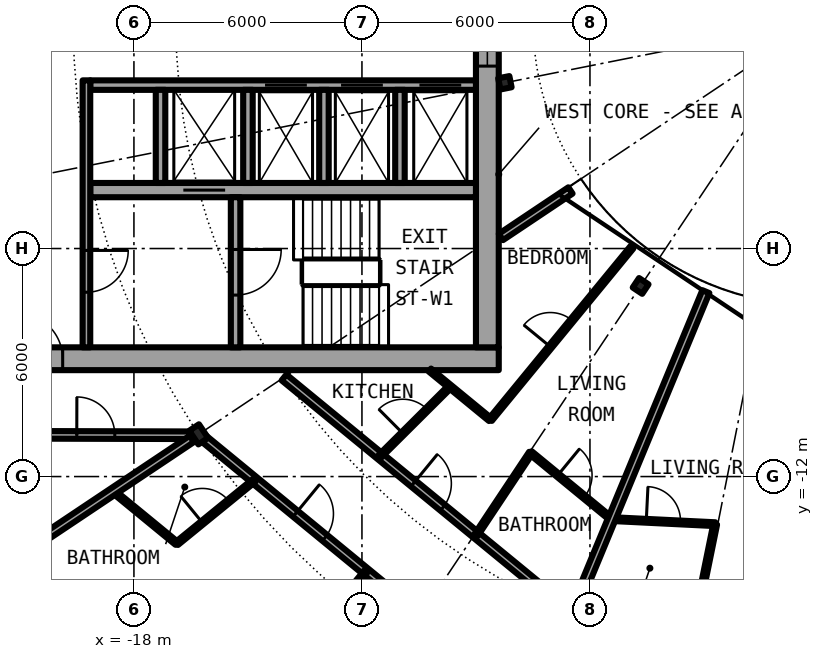
"""IFC4 building model, lengths in metres.
Left out: names, types, materials, properties, quantities, classifications, styles, units other than length and angle.
Written with IfcOpenShell. Run it as: python <this file> out.ifc"""

import sys

from ifc_helpers import new_model, si_unit, direction, frame, frame_2d, origin, origin_2d, place, context, subcontext, project, spatial, rectangle, i_section, extrude, element, fill, save


model = new_model("IFC4")
c1 = context("Model", 3, precision=1e-05, world=origin(), true_north=direction((0.0, 1.0)))
c2 = subcontext(c1, "Body", "Model", "MODEL_VIEW")
j1 = project(units=[si_unit("LENGTHUNIT", "METRE"), si_unit("PLANEANGLEUNIT", "RADIAN")], contexts=[c1])
p1 = place(None, origin())
s1 = spatial("IfcSite", under=j1, at=p1, CompositionType="ELEMENT")
p2 = place(p1, origin())
s2 = spatial("IfcBuilding", under=s1, at=p2, CompositionType="ELEMENT")
p3 = place(p2, frame((0.0, 0.0, 111.65)))
s3 = spatial("IfcBuildingStorey", under=s2, at=p3, CompositionType="ELEMENT", Elevation=111.65)
p4 = place(p3, frame((-16.297, -10.889, 0.0), z_axis=(0.0, 0.0, 1.0), x_axis=(-0.831469612303, -0.55557023302, 0.0)))
e1 = element("IfcColumn", 1, at=p4, inside=s3, PredefinedType="COLUMN", context=c2, shape_type="SweptSolid", body=[
    extrude(i_section(OverallWidth=0.307, OverallDepth=0.432, WebThickness=0.021, FlangeThickness=0.04, FilletRadius=0.027, at=origin_2d()), origin(), (0.0, 0.0, 1.0), 3.05),
])
for number, where, z_axis, x_axis in (
    (2, (-8.239, -1.639, 0.0), (0.0, 0.0, 1.0), (-0.981, -0.195, 0.0)),
    (3, (-4.667, -6.984, 0.0), (0.0, 0.0, 1.0), (-0.556, -0.831, 0.0)),
):
    element("IfcColumn", number, at=place(p3, frame(where, z_axis=z_axis, x_axis=x_axis)), inside=s3, PredefinedType="COLUMN", context=c2, shape_type="SweptSolid", body=[
        extrude(i_section(OverallWidth=0.3, OverallDepth=0.3, WebThickness=0.011, FlangeThickness=0.019, FilletRadius=0.027, at=origin_2d()), origin(), (0.0, 0.0, 1.0), 3.05),
    ])
p5 = place(p3, frame((-22.2, -8.9, 0.0), z_axis=(0.0, 0.0, 1.0), x_axis=(1.0, 0.0, 0.0)))
e4 = element("IfcWall", 4, at=p5, inside=s3, PredefinedType="SHEAR", context=c2, shape_type="SweptSolid", body=[
    extrude(rectangle(XDim=13.8, YDim=0.6, at=frame_2d((6.9, 0.0))), origin(), (0.0, 0.0, 1.0), 3.05),
])
p6 = place(p5, frame((1.125, 0.0, 0.0)))
e5 = element("IfcOpeningElement", 5, at=p6, cuts=e4, PredefinedType="OPENING", context=c2, shape_type="SweptSolid", body=[
    extrude(rectangle(XDim=1.2, YDim=2.3, at=frame_2d((0.6, 1.15))), frame((0.0, 0.31, 0.0), z_axis=(0.0, -1.0, 0.0), x_axis=(1.0, 0.0, 0.0)), (0.0, 0.0, 1.0), 0.62),
])
p7 = place(p3, frame((-8.7, 8.6, 0.0), z_axis=(0.0, 0.0, 1.0), x_axis=(0.0, -1.0, 0.0)))
e6 = element("IfcWall", 6, at=p7, inside=s3, PredefinedType="SHEAR", context=c2, shape_type="SweptSolid", body=[
    extrude(rectangle(XDim=17.2, YDim=0.6, at=frame_2d((8.6, 0.0))), origin(), (0.0, 0.0, 1.0), 3.05),
])
p8 = place(p7, frame((7.4, 0.0, 0.1)))
e7 = element("IfcOpeningElement", 7, at=p8, cuts=e6, PredefinedType="OPENING", context=c2, shape_type="SweptSolid", body=[
    extrude(rectangle(XDim=2.4, YDim=2.2, at=frame_2d((1.2, 1.1))), frame((0.0, 0.31, 0.0), z_axis=(0.0, -1.0, 0.0), x_axis=(1.0, 0.0, 0.0)), (0.0, 0.0, 1.0), 0.62),
])
p9 = place(p3, frame((-9.0, -1.7, 0.0), z_axis=(0.0, 0.0, 1.0), x_axis=(-1.0, 0.0, 0.0)))
e8 = element("IfcWall", 8, at=p9, inside=s3, PredefinedType="SHEAR", context=c2, shape_type="SweptSolid", body=[
    extrude(rectangle(XDim=10.15, YDim=0.25, at=frame_2d((5.075, 0.0))), origin(), (0.0, 0.0, 1.0), 3.05),
])
p10 = place(p9, frame((0.387, 0.0, 0.0)))
e9 = element("IfcOpeningElement", 9, at=p10, cuts=e8, PredefinedType="OPENING", context=c2, shape_type="SweptSolid", body=[
    extrude(rectangle(XDim=1.1, YDim=2.3, at=frame_2d((0.55, 1.15))), frame((0.0, 0.135, 0.0), z_axis=(0.0, -1.0, 0.0), x_axis=(1.0, 0.0, 0.0)), (0.0, 0.0, 1.0), 0.27),
])
p11 = place(p9, frame((2.45, 0.0, 0.0)))
e10 = element("IfcOpeningElement", 10, at=p11, cuts=e8, PredefinedType="OPENING", context=c2, shape_type="SweptSolid", body=[
    extrude(rectangle(XDim=1.1, YDim=2.3, at=frame_2d((0.55, 1.15))), frame((0.0, 0.135, 0.0), z_axis=(0.0, -1.0, 0.0), x_axis=(1.0, 0.0, 0.0)), (0.0, 0.0, 1.0), 0.27),
])
p12 = place(p9, frame((4.45, 0.0, 0.0)))
e11 = element("IfcOpeningElement", 11, at=p12, cuts=e8, PredefinedType="OPENING", context=c2, shape_type="SweptSolid", body=[
    extrude(rectangle(XDim=1.1, YDim=2.3, at=frame_2d((0.55, 1.15))), frame((0.0, 0.135, 0.0), z_axis=(0.0, -1.0, 0.0), x_axis=(1.0, 0.0, 0.0)), (0.0, 0.0, 1.0), 0.27),
])
p13 = place(p3, frame((-9.0, -4.462, 0.0), z_axis=(0.0, 0.0, 1.0), x_axis=(-1.0, 0.0, 0.0)))
e12 = element("IfcWall", 12, at=p13, inside=s3, PredefinedType="SHEAR", context=c2, shape_type="SweptSolid", body=[
    extrude(rectangle(XDim=10.15, YDim=0.375, at=frame_2d((5.075, 0.0))), origin(), (0.0, 0.0, 1.0), 3.05),
])
p14 = place(p13, frame((6.6, 0.0, 0.0)))
e13 = element("IfcOpeningElement", 13, at=p14, cuts=e12, PredefinedType="OPENING", context=c2, shape_type="SweptSolid", body=[
    extrude(rectangle(XDim=1.1, YDim=2.3, at=frame_2d((0.55, 1.15))), frame((0.0, 0.198, 0.0), z_axis=(0.0, -1.0, 0.0), x_axis=(1.0, 0.0, 0.0)), (0.0, 0.0, 1.0), 0.395),
])
p15 = place(p3, frame((-15.325, -4.65, 0.0), z_axis=(0.0, 0.0, 1.0), x_axis=(0.0, -1.0, 0.0)))
e14 = element("IfcWall", 14, at=p15, inside=s3, PredefinedType="SHEAR", context=c2, shape_type="SweptSolid", body=[
    extrude(rectangle(XDim=3.95, YDim=0.25, at=frame_2d((1.975, 0.0))), origin(), (0.0, 0.0, 1.0), 3.05),
])
p16 = place(p15, frame((1.375, 0.0, 0.0)))
e15 = element("IfcOpeningElement", 15, at=p16, cuts=e14, PredefinedType="OPENING", context=c2, shape_type="SweptSolid", body=[
    extrude(rectangle(XDim=1.2, YDim=2.3, at=frame_2d((0.6, 1.15))), frame((0.0, 0.135, 0.0), z_axis=(0.0, -1.0, 0.0), x_axis=(1.0, 0.0, 0.0)), (0.0, 0.0, 1.0), 0.27),
])
for number, where, z_axis, x_axis in (
    (16, (-15.0, -1.825, 0.0), (0.0, 0.0, 1.0), (0.0, -1.0, 0.0)),
    (17, (-17.3, -1.825, 0.0), (0.0, 0.0, 1.0), (0.0, -1.0, 0.0)),
):
    element("IfcWall", number, at=place(p3, frame(where, z_axis=z_axis, x_axis=x_axis)), inside=s3, PredefinedType="SOLIDWALL", context=c2, shape_type="SweptSolid", body=[
        extrude(rectangle(XDim=2.45, YDim=0.25, at=frame_2d((1.225, 0.0))), origin(), (0.0, 0.0, 1.0), 2.7),
    ])
p17 = place(p3, frame((-19.25, -1.575, 0.0), z_axis=(0.0, 0.0, 1.0), x_axis=(0.0, -1.0, 0.0)))
e18 = element("IfcWall", 18, at=p17, inside=s3, PredefinedType="SOLIDWALL", context=c2, shape_type="SweptSolid", body=[
    extrude(rectangle(XDim=7.025, YDim=0.2, at=frame_2d((3.513, 0.0))), origin(), (0.0, 0.0, 1.0), 2.7),
])
p18 = place(p17, frame((4.475, 0.0, 0.0)))
e19 = element("IfcOpeningElement", 19, at=p18, cuts=e18, PredefinedType="OPENING", context=c2, shape_type="SweptSolid", body=[
    extrude(rectangle(XDim=1.1, YDim=2.3, at=frame_2d((0.55, 1.15))), frame((0.0, 0.11, 0.0), z_axis=(0.0, -1.0, 0.0), x_axis=(1.0, 0.0, 0.0)), (0.0, 0.0, 1.0), 0.22),
])
for number, where, z_axis, x_axis in (
    (20, (-11.0, -1.825, 0.0), (0.0, 0.0, 1.0), (0.0, -1.0, 0.0)),
    (21, (-13.0, -1.825, 0.0), (0.0, 0.0, 1.0), (0.0, -1.0, 0.0)),
):
    element("IfcWall", number, at=place(p3, frame(where, z_axis=z_axis, x_axis=x_axis)), inside=s3, PredefinedType="SOLIDWALL", context=c2, shape_type="SweptSolid", body=[
        extrude(rectangle(XDim=2.45, YDim=0.25, at=frame_2d((1.225, 0.0))), origin(), (0.0, 0.0, 1.0), 2.7),
    ])
p19 = place(p3, frame((-18.542, -12.389, 0.0), z_axis=(0.0, 0.0, 1.0), x_axis=(0.772948171844, -0.634469166818, 0.0)))
e22 = element("IfcWall", 22, at=p19, inside=s3, PredefinedType="PARTITIONING", context=c2, shape_type="SweptSolid", body=[
    extrude(rectangle(XDim=2.158, YDim=0.1, at=frame_2d((1.079, 0.0))), origin(), (0.0, 0.0, 1.0), 2.7),
])
p20 = place(p3, frame((-16.173, -10.991, 0.0), z_axis=(0.0, 0.0, 1.0), x_axis=(0.773013989296, -0.634388975591, 0.0)))
e23 = element("IfcWall", 23, at=p20, inside=s3, PredefinedType="PARTITIONING", context=c2, shape_type="SweptSolid", body=[
    extrude(rectangle(XDim=11.219, YDim=0.2, at=frame_2d((5.609, 0.0))), origin(), (0.0, 0.0, 1.0), 2.39),
])
p21 = place(p20, frame((3.135, 0.0, 0.0)))
e24 = element("IfcOpeningElement", 24, at=p21, cuts=e23, PredefinedType="OPENING", context=c2, shape_type="SweptSolid", body=[
    extrude(rectangle(XDim=1.0, YDim=2.3, at=frame_2d((0.5, 1.15))), frame((0.0, 0.11, 0.0), z_axis=(0.0, -1.0, 0.0), x_axis=(1.0, 0.0, 0.0)), (0.0, 0.0, 1.0), 0.22),
])
p22 = place(p3, frame((-14.05, -9.392, 0.0), z_axis=(0.0, 0.0, 1.0), x_axis=(0.773074935257, -0.634314704605, 0.0)))
e25 = element("IfcWall", 25, at=p22, inside=s3, PredefinedType="PARTITIONING", context=c2, shape_type="SweptSolid", body=[
    extrude(rectangle(XDim=9.809, YDim=0.2, at=frame_2d((4.904, 0.0))), origin(), (0.0, 0.0, 1.0), 2.7),
])
p23 = place(p22, frame((4.402, 0.0, 0.0)))
e26 = element("IfcOpeningElement", 26, at=p23, cuts=e25, PredefinedType="OPENING", context=c2, shape_type="SweptSolid", body=[
    extrude(rectangle(XDim=1.0, YDim=2.3, at=frame_2d((0.5, 1.15))), frame((0.0, 0.11, 0.0), z_axis=(0.0, -1.0, 0.0), x_axis=(1.0, 0.0, 0.0)), (0.0, 0.0, 1.0), 0.22),
])
p24 = place(p3, frame((-10.213, -9.197, 0.0), z_axis=(0.0, 0.0, 1.0), x_axis=(0.772817828959, -0.634627925042, 0.0)))
e27 = element("IfcWall", 27, at=p24, inside=s3, PredefinedType="PARTITIONING", context=c2, shape_type="SweptSolid", body=[
    extrude(rectangle(XDim=2.055, YDim=0.1, at=frame_2d((1.027, 0.0))), origin(), (0.0, 0.0, 1.0), 2.7),
])
p25 = place(p3, frame((-7.563, -11.373, 0.0), z_axis=(0.0, 0.0, 1.0), x_axis=(0.772732480827, -0.634731843439, 0.0)))
e28 = element("IfcWall", 28, at=p25, inside=s3, PredefinedType="PARTITIONING", context=c2, shape_type="SweptSolid", body=[
    extrude(rectangle(XDim=2.748, YDim=0.1, at=frame_2d((1.374, 0.0))), origin(), (0.0, 0.0, 1.0), 2.7),
])
p26 = place(p25, frame((0.93, 0.0, 0.0)))
e29 = element("IfcOpeningElement", 29, at=p26, cuts=e28, PredefinedType="OPENING", context=c2, shape_type="SweptSolid", body=[
    extrude(rectangle(XDim=0.9, YDim=2.3, at=frame_2d((0.45, 1.15))), frame((0.0, 0.06, 0.0), z_axis=(0.0, -1.0, 0.0), x_axis=(1.0, 0.0, 0.0)), (0.0, 0.0, 1.0), 0.12),
])
p27 = place(p3, frame((-5.434, -13.119, 0.0), z_axis=(0.0, 0.0, 1.0), x_axis=(0.998796928508, -0.049037695739, 0.0)))
e30 = element("IfcWall", 30, at=p27, inside=s3, PredefinedType="PARTITIONING", context=c2, shape_type="SweptSolid", body=[
    extrude(rectangle(XDim=2.733, YDim=0.1, at=frame_2d((1.367, 0.0))), origin(), (0.0, 0.0, 1.0), 2.7),
])
p28 = place(p27, frame((0.917, 0.0, 0.0)))
e31 = element("IfcOpeningElement", 31, at=p28, cuts=e30, PredefinedType="OPENING", context=c2, shape_type="SweptSolid", body=[
    extrude(rectangle(XDim=0.9, YDim=2.3, at=frame_2d((0.45, 1.15))), frame((0.0, 0.06, 0.0), z_axis=(0.0, -1.0, 0.0), x_axis=(1.0, 0.0, 0.0)), (0.0, 0.0, 1.0), 0.12),
])
p29 = place(p3, frame((-21.675, -10.9, 0.0), z_axis=(0.0, 0.0, 1.0), x_axis=(0.99999670426, -0.002567385634, 0.0)))
e32 = element("IfcWall", 32, at=p29, inside=s3, PredefinedType="PARTITIONING", context=c2, shape_type="SweptSolid", body=[
    extrude(rectangle(XDim=5.135, YDim=0.2, at=frame_2d((2.567, 0.0))), origin(), (0.0, 0.0, 1.0), 2.7),
])
p30 = place(p29, frame((2.171, 0.0, 0.0)))
e33 = element("IfcOpeningElement", 33, at=p30, cuts=e32, PredefinedType="OPENING", context=c2, shape_type="SweptSolid", body=[
    extrude(rectangle(XDim=1.0, YDim=2.3, at=frame_2d((0.5, 1.15))), frame((0.0, 0.11, 0.0), z_axis=(0.0, -1.0, 0.0), x_axis=(1.0, 0.0, 0.0)), (0.0, 0.0, 1.0), 0.22),
])
p31 = place(p3, frame((-6.513, -4.472, 0.0), z_axis=(0.0, 0.0, 1.0), x_axis=(-0.831333375071, -0.555774072347, 0.0)))
e34 = element("IfcWall", 34, at=p31, inside=s3, PredefinedType="PARTITIONING", context=c2, shape_type="SweptSolid", body=[
    extrude(rectangle(XDim=2.203, YDim=0.2, at=frame_2d((1.101, 0.0))), origin(), (0.0, 0.0, 1.0), 2.7),
])
p32 = place(p3, frame((-22.595, -15.097, 0.0), z_axis=(0.0, 0.0, 1.0), x_axis=(0.831467903109, 0.555572791, 0.0)))
e35 = element("IfcWall", 35, at=p32, inside=s3, PredefinedType="PARTITIONING", context=c2, shape_type="SweptSolid", body=[
    extrude(rectangle(XDim=7.358, YDim=0.2, at=frame_2d((3.679, 0.0))), origin(), (0.0, 0.0, 1.0), 2.7),
])
p33 = place(p3, frame((-17.24, -21.007, 0.0), z_axis=(0.0, 0.0, 1.0), x_axis=(0.634396151441, 0.77300810024, 0.0)))
e36 = element("IfcWall", 36, at=p33, inside=s3, PredefinedType="PARTITIONING", context=c2, shape_type="SweptSolid", body=[
    extrude(rectangle(XDim=8.419, YDim=0.1, at=frame_2d((4.209, 0.0))), origin(), (0.0, 0.0, 1.0), 2.7),
])
p34 = place(p33, frame((6.679, 0.0, 0.0)))
e37 = element("IfcOpeningElement", 37, at=p34, cuts=e36, PredefinedType="OPENING", context=c2, shape_type="SweptSolid", body=[
    extrude(rectangle(XDim=0.9, YDim=2.3, at=frame_2d((0.45, 1.15))), frame((0.0, 0.06, 0.0), z_axis=(0.0, -1.0, 0.0), x_axis=(1.0, 0.0, 0.0)), (0.0, 0.0, 1.0), 0.12),
])
p35 = place(p33, frame((2.468, 0.0, 0.0)))
e38 = element("IfcOpeningElement", 38, at=p35, cuts=e36, PredefinedType="OPENING", context=c2, shape_type="SweptSolid", body=[
    extrude(rectangle(XDim=0.9, YDim=2.3, at=frame_2d((0.45, 1.15))), frame((0.0, 0.06, 0.0), z_axis=(0.0, -1.0, 0.0), x_axis=(1.0, 0.0, 0.0)), (0.0, 0.0, 1.0), 0.12),
])
p36 = place(p3, frame((-16.872, -13.761, 0.0), z_axis=(0.0, 0.0, 1.0), x_axis=(0.774979608522, 0.631986239072, 0.0)))
e39 = element("IfcWall", 39, at=p36, inside=s3, PredefinedType="PARTITIONING", context=c2, shape_type="SweptSolid", body=[
    extrude(rectangle(XDim=2.636, YDim=0.1, at=frame_2d((1.318, 0.0))), origin(), (0.0, 0.0, 1.0), 2.7),
])
p37 = place(p36, frame((0.868, 0.0, 0.0)))
e40 = element("IfcOpeningElement", 40, at=p37, cuts=e39, PredefinedType="OPENING", context=c2, shape_type="SweptSolid", body=[
    extrude(rectangle(XDim=0.9, YDim=2.3, at=frame_2d((0.45, 1.15))), frame((0.0, 0.06, 0.0), z_axis=(0.0, -1.0, 0.0), x_axis=(1.0, 0.0, 0.0)), (0.0, 0.0, 1.0), 0.12),
])
p38 = place(p3, frame((-11.524, -11.464, 0.0), z_axis=(0.0, 0.0, 1.0), x_axis=(0.708796844581, 0.705412668665, 0.0)))
e41 = element("IfcWall", 41, at=p38, inside=s3, PredefinedType="PARTITIONING", context=c2, shape_type="SweptSolid", body=[
    extrude(rectangle(XDim=2.597, YDim=0.1, at=frame_2d((1.299, 0.0))), origin(), (0.0, 0.0, 1.0), 2.7),
])
p39 = place(p38, frame((0.849, 0.0, 0.0)))
e42 = element("IfcOpeningElement", 42, at=p39, cuts=e41, PredefinedType="OPENING", context=c2, shape_type="SweptSolid", body=[
    extrude(rectangle(XDim=0.9, YDim=2.3, at=frame_2d((0.45, 1.15))), frame((0.0, 0.06, 0.0), z_axis=(0.0, -1.0, 0.0), x_axis=(1.0, 0.0, 0.0)), (0.0, 0.0, 1.0), 0.12),
])
p40 = place(p3, frame((-8.996, -13.539, 0.0), z_axis=(0.0, 0.0, 1.0), x_axis=(0.553615197403, 0.83277260594, 0.0)))
e43 = element("IfcWall", 43, at=p40, inside=s3, PredefinedType="PARTITIONING", context=c2, shape_type="SweptSolid", body=[
    extrude(rectangle(XDim=2.597, YDim=0.1, at=frame_2d((1.299, 0.0))), origin(), (0.0, 0.0, 1.0), 2.7),
])
p41 = place(p3, frame((-8.62, -10.504, 0.0), z_axis=(0.0, 0.0, 1.0), x_axis=(0.634539754242, 0.772890225249, 0.0)))
e44 = element("IfcWall", 44, at=p41, inside=s3, PredefinedType="PARTITIONING", context=c2, shape_type="SweptSolid", body=[
    extrude(rectangle(XDim=5.867, YDim=0.1, at=frame_2d((2.934, 0.0))), origin(), (0.0, 0.0, 1.0), 2.7),
])
p42 = place(p41, frame((2.484, 0.0, 0.0)))
e45 = element("IfcOpeningElement", 45, at=p42, cuts=e44, PredefinedType="OPENING", context=c2, shape_type="SweptSolid", body=[
    extrude(rectangle(XDim=0.9, YDim=2.3, at=frame_2d((0.45, 1.15))), frame((0.0, 0.06, 0.0), z_axis=(0.0, -1.0, 0.0), x_axis=(1.0, 0.0, 0.0)), (0.0, 0.0, 1.0), 0.12),
])
p43 = place(p3, frame((-6.462, -15.616, 0.0), z_axis=(0.0, 0.0, 1.0), x_axis=(0.382556139466, 0.923932248683, 0.0)))
e46 = element("IfcWall", 46, at=p43, inside=s3, PredefinedType="PARTITIONING", context=c2, shape_type="SweptSolid", body=[
    extrude(rectangle(XDim=9.18, YDim=0.2, at=frame_2d((4.59, 0.0))), origin(), (0.0, 0.0, 1.0), 2.7),
])
p44 = place(p3, frame((-3.218, -15.773, 0.0), z_axis=(0.0, 0.0, 1.0), x_axis=(0.199820523641, 0.979832515449, 0.0)))
e47 = element("IfcWall", 47, at=p44, inside=s3, PredefinedType="PARTITIONING", context=c2, shape_type="SweptSolid", body=[
    extrude(rectangle(XDim=2.572, YDim=0.1, at=frame_2d((1.286, 0.0))), origin(), (0.0, 0.0, 1.0), 2.7),
])
p45 = place(p10, origin())
e48 = element("IfcDoor", 48, at=p45, inside=s3, OperationType="DOUBLE_DOOR_SLIDING", PredefinedType="DOOR", context=c2, shape_type="SweptSolid", body=[
    extrude(rectangle(XDim=1.1, YDim=2.3, at=frame_2d((0.55, 1.15))), frame((0.0, 0.025, 0.0), z_axis=(0.0, -1.0, 0.0), x_axis=(1.0, 0.0, 0.0)), (0.0, 0.0, 1.0), 0.05),
])
fill(e9, e48)
p46 = place(p11, origin())
e49 = element("IfcDoor", 49, at=p46, inside=s3, OperationType="DOUBLE_DOOR_SLIDING", PredefinedType="DOOR", context=c2, shape_type="SweptSolid", body=[
    extrude(rectangle(XDim=1.1, YDim=2.3, at=frame_2d((0.55, 1.15))), frame((0.0, 0.025, 0.0), z_axis=(0.0, -1.0, 0.0), x_axis=(1.0, 0.0, 0.0)), (0.0, 0.0, 1.0), 0.05),
])
fill(e10, e49)
p47 = place(p12, origin())
e50 = element("IfcDoor", 50, at=p47, inside=s3, OperationType="DOUBLE_DOOR_SLIDING", PredefinedType="DOOR", context=c2, shape_type="SweptSolid", body=[
    extrude(rectangle(XDim=1.1, YDim=2.3, at=frame_2d((0.55, 1.15))), frame((0.0, 0.025, 0.0), z_axis=(0.0, -1.0, 0.0), x_axis=(1.0, 0.0, 0.0)), (0.0, 0.0, 1.0), 0.05),
])
fill(e11, e50)
p48 = place(p14, origin())
e51 = element("IfcDoor", 51, at=p48, inside=s3, OperationType="DOUBLE_DOOR_SLIDING", PredefinedType="DOOR", context=c2, shape_type="SweptSolid", body=[
    extrude(rectangle(XDim=1.1, YDim=2.3, at=frame_2d((0.55, 1.15))), frame((0.0, 0.025, 0.0), z_axis=(0.0, -1.0, 0.0), x_axis=(1.0, 0.0, 0.0)), (0.0, 0.0, 1.0), 0.05),
])
fill(e13, e51)
p49 = place(p16, origin())
e52 = element("IfcDoor", 52, at=p49, inside=s3, OperationType="SINGLE_SWING_LEFT", PredefinedType="DOOR", context=c2, shape_type="SweptSolid", body=[
    extrude(rectangle(XDim=1.2, YDim=2.3, at=frame_2d((0.6, 1.15))), frame((0.0, 0.025, 0.0), z_axis=(0.0, -1.0, 0.0), x_axis=(1.0, 0.0, 0.0)), (0.0, 0.0, 1.0), 0.05),
])
fill(e15, e52)
p50 = place(p18, origin())
e53 = element("IfcDoor", 53, at=p50, inside=s3, OperationType="SINGLE_SWING_LEFT", PredefinedType="DOOR", context=c2, shape_type="SweptSolid", body=[
    extrude(rectangle(XDim=1.1, YDim=2.3, at=frame_2d((0.55, 1.15))), frame((0.0, 0.025, 0.0), z_axis=(0.0, -1.0, 0.0), x_axis=(1.0, 0.0, 0.0)), (0.0, 0.0, 1.0), 0.05),
])
fill(e19, e53)
p51 = place(p6, origin())
e54 = element("IfcDoor", 54, at=p51, inside=s3, OperationType="SINGLE_SWING_RIGHT", PredefinedType="DOOR", context=c2, shape_type="SweptSolid", body=[
    extrude(rectangle(XDim=1.2, YDim=2.3, at=frame_2d((0.6, 1.15))), frame((0.0, 0.025, 0.0), z_axis=(0.0, -1.0, 0.0), x_axis=(1.0, 0.0, 0.0)), (0.0, 0.0, 1.0), 0.05),
])
fill(e5, e54)
p52 = place(p8, origin())
e55 = element("IfcWindow", 55, at=p52, inside=s3, PartitioningType="SINGLE_PANEL", PredefinedType="WINDOW", context=c2, shape_type="SweptSolid", body=[
    extrude(rectangle(XDim=2.4, YDim=2.2, at=frame_2d((1.2, 1.1))), frame((0.0, 0.03, 0.0), z_axis=(0.0, -1.0, 0.0), x_axis=(1.0, 0.0, 0.0)), (0.0, 0.0, 1.0), 0.06),
])
fill(e7, e55)
p53 = place(p21, origin())
e56 = element("IfcDoor", 56, at=p53, inside=s3, OperationType="SINGLE_SWING_LEFT", PredefinedType="DOOR", context=c2, shape_type="SweptSolid", body=[
    extrude(rectangle(XDim=1.0, YDim=2.3, at=frame_2d((0.5, 1.15))), frame((0.0, 0.025, 0.0), z_axis=(0.0, -1.0, 0.0), x_axis=(1.0, 0.0, 0.0)), (0.0, 0.0, 1.0), 0.05),
])
fill(e24, e56)
p54 = place(p37, origin())
e57 = element("IfcDoor", 57, at=p54, inside=s3, OperationType="SINGLE_SWING_RIGHT", PredefinedType="DOOR", context=c2, shape_type="SweptSolid", body=[
    extrude(rectangle(XDim=0.9, YDim=2.3, at=frame_2d((0.45, 1.15))), frame((0.0, 0.025, 0.0), z_axis=(0.0, -1.0, 0.0), x_axis=(1.0, 0.0, 0.0)), (0.0, 0.0, 1.0), 0.05),
])
fill(e40, e57)
p55 = place(p23, origin())
e58 = element("IfcDoor", 58, at=p55, inside=s3, OperationType="SINGLE_SWING_LEFT", PredefinedType="DOOR", context=c2, shape_type="SweptSolid", body=[
    extrude(rectangle(XDim=1.0, YDim=2.3, at=frame_2d((0.5, 1.15))), frame((0.0, 0.025, 0.0), z_axis=(0.0, -1.0, 0.0), x_axis=(1.0, 0.0, 0.0)), (0.0, 0.0, 1.0), 0.05),
])
fill(e26, e58)
p56 = place(p26, origin())
e59 = element("IfcDoor", 59, at=p56, inside=s3, OperationType="SINGLE_SWING_RIGHT", PredefinedType="DOOR", context=c2, shape_type="SweptSolid", body=[
    extrude(rectangle(XDim=0.9, YDim=2.3, at=frame_2d((0.45, 1.15))), frame((0.0, 0.025, 0.0), z_axis=(0.0, -1.0, 0.0), x_axis=(1.0, 0.0, 0.0)), (0.0, 0.0, 1.0), 0.05),
])
fill(e29, e59)
p57 = place(p39, origin())
e60 = element("IfcDoor", 60, at=p57, inside=s3, OperationType="SINGLE_SWING_RIGHT", PredefinedType="DOOR", context=c2, shape_type="SweptSolid", body=[
    extrude(rectangle(XDim=0.9, YDim=2.3, at=frame_2d((0.45, 1.15))), frame((0.0, 0.025, 0.0), z_axis=(0.0, -1.0, 0.0), x_axis=(1.0, 0.0, 0.0)), (0.0, 0.0, 1.0), 0.05),
])
fill(e42, e60)
p58 = place(p42, origin())
e61 = element("IfcDoor", 61, at=p58, inside=s3, OperationType="SINGLE_SWING_RIGHT", PredefinedType="DOOR", context=c2, shape_type="SweptSolid", body=[
    extrude(rectangle(XDim=0.9, YDim=2.3, at=frame_2d((0.45, 1.15))), frame((0.0, 0.025, 0.0), z_axis=(0.0, -1.0, 0.0), x_axis=(1.0, 0.0, 0.0)), (0.0, 0.0, 1.0), 0.05),
])
fill(e45, e61)
p59 = place(p28, origin())
e62 = element("IfcDoor", 62, at=p59, inside=s3, OperationType="SINGLE_SWING_LEFT", PredefinedType="DOOR", context=c2, shape_type="SweptSolid", body=[
    extrude(rectangle(XDim=0.9, YDim=2.3, at=frame_2d((0.45, 1.15))), frame((0.0, 0.025, 0.0), z_axis=(0.0, -1.0, 0.0), x_axis=(1.0, 0.0, 0.0)), (0.0, 0.0, 1.0), 0.05),
])
fill(e31, e62)
p60 = place(p30, origin())
e63 = element("IfcDoor", 63, at=p60, inside=s3, OperationType="SINGLE_SWING_RIGHT", PredefinedType="DOOR", context=c2, shape_type="SweptSolid", body=[
    extrude(rectangle(XDim=1.0, YDim=2.3, at=frame_2d((0.5, 1.15))), frame((0.0, 0.025, 0.0), z_axis=(0.0, -1.0, 0.0), x_axis=(1.0, 0.0, 0.0)), (0.0, 0.0, 1.0), 0.05),
])
fill(e33, e63)
save(model, sys.argv[1])
